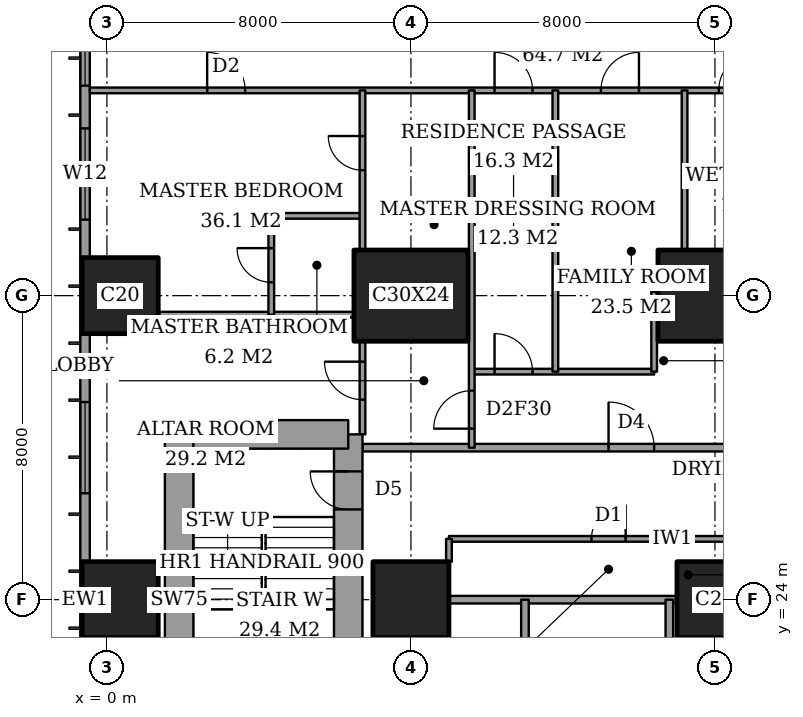
"""IFC4 building model, lengths in metres.
Left out: names, types, materials, properties, quantities, classifications, styles, units other than length and angle.
Written with IfcOpenShell. Run it as: python <this file> out.ifc"""

import sys

from ifc_helpers import new_model, si_unit, direction, frame, frame_2d, origin, origin_2d, place, context, subcontext, project, spatial, rectangle, extrude, element, fill, save


model = new_model("IFC4")
c1 = context("Model", 3, precision=1e-05, world=origin(), true_north=direction((0.0, 1.0)))
c2 = subcontext(c1, "Body", "Model", "MODEL_VIEW")
j1 = project(units=[si_unit("LENGTHUNIT", "METRE"), si_unit("PLANEANGLEUNIT", "RADIAN")], contexts=[c1])
p1 = place(None, origin())
s1 = spatial("IfcSite", under=j1, at=p1, CompositionType="ELEMENT")
p2 = place(p1, origin())
s2 = spatial("IfcBuilding", under=s1, at=p2, CompositionType="ELEMENT")
p3 = place(p2, frame((0.0, 0.0, 146.6)))
s3 = spatial("IfcBuildingStorey", under=s2, at=p3, CompositionType="ELEMENT", Elevation=146.6)
for number, where, z_axis, x_axis in (
    (1, (0.35, 24.0, 0.0), (0.0, 0.0, 1.0), (1.0, 0.0, 0.0)),
    (2, (0.35, 32.0, 0.0), (0.0, 0.0, 1.0), (1.0, 0.0, 0.0)),
    (3, (8.0, 24.0, 0.0), (0.0, 0.0, 1.0), (1.0, 0.0, 0.0)),
):
    element("IfcColumn", number, at=place(p3, frame(where, z_axis=z_axis, x_axis=x_axis)), inside=s3, PredefinedType="COLUMN", context=c2, shape_type="SweptSolid", body=[
        extrude(rectangle(XDim=2.0, YDim=2.0, at=origin_2d()), origin(), (0.0, 0.0, 1.0), 3.6),
    ])
p4 = place(p3, frame((8.0, 32.0, 0.0), z_axis=(0.0, 0.0, 1.0), x_axis=(1.0, 0.0, 0.0)))
e4 = element("IfcColumn", 4, at=p4, inside=s3, PredefinedType="COLUMN", context=c2, shape_type="SweptSolid", body=[
    extrude(rectangle(XDim=3.0, YDim=2.4, at=origin_2d()), origin(), (0.0, 0.0, 1.0), 3.6),
])
p5 = place(p3, frame((16.0, 24.0, 0.0), z_axis=(0.0, 0.0, 1.0), x_axis=(1.0, 0.0, 0.0)))
e5 = element("IfcColumn", 5, at=p5, inside=s3, PredefinedType="COLUMN", context=c2, shape_type="SweptSolid", body=[
    extrude(rectangle(XDim=2.0, YDim=2.0, at=origin_2d()), origin(), (0.0, 0.0, 1.0), 3.6),
])
p6 = place(p3, frame((16.0, 32.0, 0.0), z_axis=(0.0, 0.0, 1.0), x_axis=(1.0, 0.0, 0.0)))
e6 = element("IfcColumn", 6, at=p6, inside=s3, PredefinedType="COLUMN", context=c2, shape_type="SweptSolid", body=[
    extrude(rectangle(XDim=3.0, YDim=2.4, at=origin_2d()), origin(), (0.0, 0.0, 1.0), 3.6),
])
p7 = place(p3, frame((6.35, 19.65, 0.0), z_axis=(0.0, 0.0, 1.0), x_axis=(0.0, 1.0, 0.0)))
e7 = element("IfcWall", 7, at=p7, inside=s3, PredefinedType="SHEAR", context=c2, shape_type="SweptSolid", body=[
    extrude(rectangle(XDim=8.7, YDim=0.75, at=frame_2d((4.35, 0.0))), origin(), (0.0, 0.0, 1.0), 3.6),
])
p8 = place(p7, frame((6.725, 0.0, 0.0)))
e8 = element("IfcOpeningElement", 8, at=p8, cuts=e7, PredefinedType="OPENING", context=c2, shape_type="SweptSolid", body=[
    extrude(rectangle(XDim=1.0, YDim=2.1, at=frame_2d((0.5, 1.05))), frame((0.0, 0.385, 0.0), z_axis=(0.0, -1.0, 0.0), x_axis=(1.0, 0.0, 0.0)), (0.0, 0.0, 1.0), 0.77),
])
p9 = place(p3, frame((6.35, 28.35, 0.0), z_axis=(0.0, 0.0, 1.0), x_axis=(-1.0, 0.0, 0.0)))
e9 = element("IfcWall", 9, at=p9, inside=s3, PredefinedType="SHEAR", context=c2, shape_type="SweptSolid", body=[
    extrude(rectangle(XDim=4.45, YDim=0.75, at=frame_2d((2.225, 0.0))), origin(), (0.0, 0.0, 1.0), 3.6),
])
p10 = place(p3, frame((1.9, 28.35, 0.0), z_axis=(0.0, 0.0, 1.0), x_axis=(0.0, -1.0, 0.0)))
e10 = element("IfcWall", 10, at=p10, inside=s3, PredefinedType="SHEAR", context=c2, shape_type="SweptSolid", body=[
    extrude(rectangle(XDim=8.7, YDim=0.75, at=frame_2d((4.35, 0.0))), origin(), (0.0, 0.0, 1.0), 3.6),
])
p11 = place(p3, frame((-0.575, 44.825, 0.0), z_axis=(0.0, 0.0, 1.0), x_axis=(0.0, -1.0, 0.0)))
e11 = element("IfcWall", 11, at=p11, inside=s3, PredefinedType="SOLIDWALL", context=c2, shape_type="SweptSolid", body=[
    extrude(rectangle(XDim=41.65, YDim=0.25, at=frame_2d((20.825, 0.0))), origin(), (0.0, 0.0, 1.0), 3.6),
])
p12 = place(p11, frame((0.775, 0.0, 0.4)))
e12 = element("IfcOpeningElement", 12, at=p12, cuts=e11, PredefinedType="OPENING", context=c2, shape_type="SweptSolid", body=[
    extrude(rectangle(XDim=2.4, YDim=2.2, at=frame_2d((1.2, 1.1))), frame((0.0, 0.135, 0.0), z_axis=(0.0, -1.0, 0.0), x_axis=(1.0, 0.0, 0.0)), (0.0, 0.0, 1.0), 0.27),
])
p13 = place(p11, frame((6.1, 0.0, 0.4)))
e13 = element("IfcOpeningElement", 13, at=p13, cuts=e11, PredefinedType="OPENING", context=c2, shape_type="SweptSolid", body=[
    extrude(rectangle(XDim=1.2, YDim=2.2, at=frame_2d((0.6, 1.1))), frame((0.0, 0.135, 0.0), z_axis=(0.0, -1.0, 0.0), x_axis=(1.0, 0.0, 0.0)), (0.0, 0.0, 1.0), 0.27),
])
p14 = place(p11, frame((8.425, 0.0, 0.4)))
e14 = element("IfcOpeningElement", 14, at=p14, cuts=e11, PredefinedType="OPENING", context=c2, shape_type="SweptSolid", body=[
    extrude(rectangle(XDim=2.4, YDim=2.2, at=frame_2d((1.2, 1.1))), frame((0.0, 0.135, 0.0), z_axis=(0.0, -1.0, 0.0), x_axis=(1.0, 0.0, 0.0)), (0.0, 0.0, 1.0), 0.27),
])
p15 = place(p11, frame((15.625, 0.0, 0.4)))
e15 = element("IfcOpeningElement", 15, at=p15, cuts=e11, PredefinedType="OPENING", context=c2, shape_type="SweptSolid", body=[
    extrude(rectangle(XDim=2.4, YDim=2.2, at=frame_2d((1.2, 1.1))), frame((0.0, 0.135, 0.0), z_axis=(0.0, -1.0, 0.0), x_axis=(1.0, 0.0, 0.0)), (0.0, 0.0, 1.0), 0.27),
])
p16 = place(p11, frame((23.625, 0.0, 0.4)))
e16 = element("IfcOpeningElement", 16, at=p16, cuts=e11, PredefinedType="OPENING", context=c2, shape_type="SweptSolid", body=[
    extrude(rectangle(XDim=2.4, YDim=2.2, at=frame_2d((1.2, 1.1))), frame((0.0, 0.135, 0.0), z_axis=(0.0, -1.0, 0.0), x_axis=(1.0, 0.0, 0.0)), (0.0, 0.0, 1.0), 0.27),
])
p17 = place(p11, frame((30.625, 0.0, 0.4)))
e17 = element("IfcOpeningElement", 17, at=p17, cuts=e11, PredefinedType="OPENING", context=c2, shape_type="SweptSolid", body=[
    extrude(rectangle(XDim=2.4, YDim=2.2, at=frame_2d((1.2, 1.1))), frame((0.0, 0.135, 0.0), z_axis=(0.0, -1.0, 0.0), x_axis=(1.0, 0.0, 0.0)), (0.0, 0.0, 1.0), 0.27),
])
p18 = place(p11, frame((34.225, 0.0, 0.4)))
e18 = element("IfcOpeningElement", 18, at=p18, cuts=e11, PredefinedType="OPENING", context=c2, shape_type="SweptSolid", body=[
    extrude(rectangle(XDim=1.2, YDim=2.2, at=frame_2d((0.6, 1.1))), frame((0.0, 0.135, 0.0), z_axis=(0.0, -1.0, 0.0), x_axis=(1.0, 0.0, 0.0)), (0.0, 0.0, 1.0), 0.27),
])
p19 = place(p11, frame((38.475, 0.0, 0.4)))
e19 = element("IfcOpeningElement", 19, at=p19, cuts=e11, PredefinedType="OPENING", context=c2, shape_type="SweptSolid", body=[
    extrude(rectangle(XDim=2.4, YDim=2.2, at=frame_2d((1.2, 1.1))), frame((0.0, 0.135, 0.0), z_axis=(0.0, -1.0, 0.0), x_axis=(1.0, 0.0, 0.0)), (0.0, 0.0, 1.0), 0.27),
])
p20 = place(p3, frame((9.0, 24.0, 0.0), z_axis=(0.0, 0.0, 1.0), x_axis=(1.0, 0.0, 0.0)))
e20 = element("IfcWall", 20, at=p20, inside=s3, PredefinedType="PARTITIONING", context=c2, shape_type="SweptSolid", body=[
    extrude(rectangle(XDim=6.0, YDim=0.2, at=frame_2d((3.0, 0.0))), origin(), (0.0, 0.0, 1.0), 3.35),
])
p21 = place(p3, frame((9.0, 25.6, 0.0), z_axis=(0.0, 0.0, 1.0), x_axis=(1.0, 0.0, 0.0)))
e21 = element("IfcWall", 21, at=p21, inside=s3, PredefinedType="PARTITIONING", context=c2, shape_type="SweptSolid", body=[
    extrude(rectangle(XDim=8.4, YDim=0.15, at=frame_2d((4.2, 0.0))), origin(), (0.0, 0.0, 1.0), 3.35),
])
p22 = place(p21, frame((3.75, 0.0, 0.0)))
e22 = element("IfcOpeningElement", 22, at=p22, cuts=e21, PredefinedType="OPENING", context=c2, shape_type="SweptSolid", body=[
    extrude(rectangle(XDim=0.9, YDim=2.1, at=frame_2d((0.45, 1.05))), frame((0.0, 0.085, 0.0), z_axis=(0.0, -1.0, 0.0), x_axis=(1.0, 0.0, 0.0)), (0.0, 0.0, 1.0), 0.17),
])
p23 = place(p3, frame((6.725, 28.0, 0.0), z_axis=(0.0, 0.0, 1.0), x_axis=(1.0, 0.0, 0.0)))
e23 = element("IfcWall", 23, at=p23, inside=s3, PredefinedType="PARTITIONING", context=c2, shape_type="SweptSolid", body=[
    extrude(rectangle(XDim=17.275, YDim=0.2, at=frame_2d((8.637, 0.0))), origin(), (0.0, 0.0, 1.0), 3.35),
])
p24 = place(p23, frame((6.475, 0.0, 0.0)))
e24 = element("IfcOpeningElement", 24, at=p24, cuts=e23, PredefinedType="OPENING", context=c2, shape_type="SweptSolid", body=[
    extrude(rectangle(XDim=1.2, YDim=2.4, at=frame_2d((0.6, 1.2))), frame((0.0, 0.11, 0.0), z_axis=(0.0, -1.0, 0.0), x_axis=(1.0, 0.0, 0.0)), (0.0, 0.0, 1.0), 0.22),
])
p25 = place(p3, frame((9.6, 30.0, 0.0), z_axis=(0.0, 0.0, 1.0), x_axis=(1.0, 0.0, 0.0)))
e25 = element("IfcWall", 25, at=p25, inside=s3, PredefinedType="PARTITIONING", context=c2, shape_type="SweptSolid", body=[
    extrude(rectangle(XDim=4.8, YDim=0.15, at=frame_2d((2.4, 0.0))), origin(), (0.0, 0.0, 1.0), 3.35),
])
p26 = place(p25, frame((0.6, 0.0, 0.0)))
e26 = element("IfcOpeningElement", 26, at=p26, cuts=e25, PredefinedType="OPENING", context=c2, shape_type="SweptSolid", body=[
    extrude(rectangle(XDim=1.0, YDim=2.1, at=frame_2d((0.5, 1.05))), frame((0.0, 0.085, 0.0), z_axis=(0.0, -1.0, 0.0), x_axis=(1.0, 0.0, 0.0)), (0.0, 0.0, 1.0), 0.17),
])
p27 = place(p3, frame((1.35, 31.5, 0.0), z_axis=(0.0, 0.0, 1.0), x_axis=(1.0, 0.0, 0.0)))
e27 = element("IfcWall", 27, at=p27, inside=s3, PredefinedType="PARTITIONING", context=c2, shape_type="SweptSolid", body=[
    extrude(rectangle(XDim=5.15, YDim=0.15, at=frame_2d((2.575, 0.0))), origin(), (0.0, 0.0, 1.0), 3.35),
])
p28 = place(p3, frame((4.325, 34.1, 0.0), z_axis=(0.0, 0.0, 1.0), x_axis=(1.0, 0.0, 0.0)))
e28 = element("IfcWall", 28, at=p28, inside=s3, PredefinedType="PARTITIONING", context=c2, shape_type="SweptSolid", body=[
    extrude(rectangle(XDim=2.4, YDim=0.15, at=frame_2d((1.2, 0.0))), origin(), (0.0, 0.0, 1.0), 3.35),
])
p29 = place(p3, frame((-0.45, 37.4, 0.0), z_axis=(0.0, 0.0, 1.0), x_axis=(1.0, 0.0, 0.0)))
e29 = element("IfcWall", 29, at=p29, inside=s3, PredefinedType="PARTITIONING", context=c2, shape_type="SweptSolid", body=[
    extrude(rectangle(XDim=25.011, YDim=0.15, at=frame_2d((12.505, 0.0))), origin(), (0.0, 0.0, 1.0), 3.35),
])
p30 = place(p29, frame((10.65, 0.0, 0.0)))
e30 = element("IfcOpeningElement", 30, at=p30, cuts=e29, PredefinedType="OPENING", context=c2, shape_type="SweptSolid", body=[
    extrude(rectangle(XDim=1.0, YDim=2.1, at=frame_2d((0.5, 1.05))), frame((0.0, 0.085, 0.0), z_axis=(0.0, -1.0, 0.0), x_axis=(1.0, 0.0, 0.0)), (0.0, 0.0, 1.0), 0.17),
])
p31 = place(p29, frame((3.087, 0.0, 0.0)))
e31 = element("IfcOpeningElement", 31, at=p31, cuts=e29, PredefinedType="OPENING", context=c2, shape_type="SweptSolid", body=[
    extrude(rectangle(XDim=1.0, YDim=2.1, at=frame_2d((0.5, 1.05))), frame((0.0, 0.085, 0.0), z_axis=(0.0, -1.0, 0.0), x_axis=(1.0, 0.0, 0.0)), (0.0, 0.0, 1.0), 0.17),
])
p32 = place(p29, frame((13.45, 0.0, 0.0)))
e32 = element("IfcOpeningElement", 32, at=p32, cuts=e29, PredefinedType="OPENING", context=c2, shape_type="SweptSolid", body=[
    extrude(rectangle(XDim=1.0, YDim=2.1, at=frame_2d((0.5, 1.05))), frame((0.0, 0.085, 0.0), z_axis=(0.0, -1.0, 0.0), x_axis=(1.0, 0.0, 0.0)), (0.0, 0.0, 1.0), 0.17),
])
p33 = place(p29, frame((16.55, 0.0, 0.0)))
e33 = element("IfcOpeningElement", 33, at=p33, cuts=e29, PredefinedType="OPENING", context=c2, shape_type="SweptSolid", body=[
    extrude(rectangle(XDim=1.0, YDim=2.1, at=frame_2d((0.5, 1.05))), frame((0.0, 0.085, 0.0), z_axis=(0.0, -1.0, 0.0), x_axis=(1.0, 0.0, 0.0)), (0.0, 0.0, 1.0), 0.17),
])
p34 = place(p29, frame((21.175, 0.0, 0.0)))
e34 = element("IfcOpeningElement", 34, at=p34, cuts=e29, PredefinedType="OPENING", context=c2, shape_type="SweptSolid", body=[
    extrude(rectangle(XDim=1.0, YDim=2.1, at=frame_2d((0.5, 1.05))), frame((0.0, 0.085, 0.0), z_axis=(0.0, -1.0, 0.0), x_axis=(1.0, 0.0, 0.0)), (0.0, 0.0, 1.0), 0.17),
])
p35 = place(p3, frame((4.325, 31.5, 0.0), z_axis=(0.0, 0.0, 1.0), x_axis=(0.0, 1.0, 0.0)))
e35 = element("IfcWall", 35, at=p35, inside=s3, PredefinedType="PARTITIONING", context=c2, shape_type="SweptSolid", body=[
    extrude(rectangle(XDim=2.6, YDim=0.15, at=frame_2d((1.3, 0.0))), origin(), (0.0, 0.0, 1.0), 3.35),
])
p36 = place(p35, frame((0.85, 0.0, 0.0)))
e36 = element("IfcOpeningElement", 36, at=p36, cuts=e35, PredefinedType="OPENING", context=c2, shape_type="SweptSolid", body=[
    extrude(rectangle(XDim=0.9, YDim=2.1, at=frame_2d((0.45, 1.05))), frame((0.0, 0.085, 0.0), z_axis=(0.0, -1.0, 0.0), x_axis=(1.0, 0.0, 0.0)), (0.0, 0.0, 1.0), 0.17),
])
p37 = place(p3, frame((6.725, 28.35, 0.0), z_axis=(0.0, 0.0, 1.0), x_axis=(0.0, 1.0, 0.0)))
e37 = element("IfcWall", 37, at=p37, inside=s3, PredefinedType="PARTITIONING", context=c2, shape_type="SweptSolid", body=[
    extrude(rectangle(XDim=2.45, YDim=0.15, at=frame_2d((1.225, 0.0))), origin(), (0.0, 0.0, 1.0), 3.35),
])
p38 = place(p37, frame((0.913, 0.0, 0.0)))
e38 = element("IfcOpeningElement", 38, at=p38, cuts=e37, PredefinedType="OPENING", context=c2, shape_type="SweptSolid", body=[
    extrude(rectangle(XDim=1.0, YDim=2.1, at=frame_2d((0.5, 1.05))), frame((0.0, 0.085, 0.0), z_axis=(0.0, -1.0, 0.0), x_axis=(1.0, 0.0, 0.0)), (0.0, 0.0, 1.0), 0.17),
])
p39 = place(p3, frame((6.725, 33.2, 0.0), z_axis=(0.0, 0.0, 1.0), x_axis=(0.0, 1.0, 0.0)))
e39 = element("IfcWall", 39, at=p39, inside=s3, PredefinedType="PARTITIONING", context=c2, shape_type="SweptSolid", body=[
    extrude(rectangle(XDim=4.2, YDim=0.15, at=frame_2d((2.1, 0.0))), origin(), (0.0, 0.0, 1.0), 3.35),
])
p40 = place(p39, frame((2.1, 0.0, 0.0)))
e40 = element("IfcOpeningElement", 40, at=p40, cuts=e39, PredefinedType="OPENING", context=c2, shape_type="SweptSolid", body=[
    extrude(rectangle(XDim=0.9, YDim=2.1, at=frame_2d((0.45, 1.05))), frame((0.0, 0.085, 0.0), z_axis=(0.0, -1.0, 0.0), x_axis=(1.0, 0.0, 0.0)), (0.0, 0.0, 1.0), 0.17),
])
p41 = place(p3, frame((9.0, 25.0, 0.0), z_axis=(0.0, 0.0, 1.0), x_axis=(0.0, 1.0, 0.0)))
e41 = element("IfcWall", 41, at=p41, inside=s3, PredefinedType="PARTITIONING", context=c2, shape_type="SweptSolid", body=[
    extrude(rectangle(XDim=0.6, YDim=0.15, at=frame_2d((0.3, 0.0))), origin(), (0.0, 0.0, 1.0), 3.35),
])
p42 = place(p3, frame((9.6, 28.0, 0.0), z_axis=(0.0, 0.0, 1.0), x_axis=(0.0, 1.0, 0.0)))
e42 = element("IfcWall", 42, at=p42, inside=s3, PredefinedType="PARTITIONING", context=c2, shape_type="SweptSolid", body=[
    extrude(rectangle(XDim=9.4, YDim=0.15, at=frame_2d((4.7, 0.0))), origin(), (0.0, 0.0, 1.0), 3.35),
])
p43 = place(p42, frame((0.5, 0.0, 0.0)))
e43 = element("IfcOpeningElement", 43, at=p43, cuts=e42, PredefinedType="OPENING", context=c2, shape_type="SweptSolid", body=[
    extrude(rectangle(XDim=1.0, YDim=2.1, at=frame_2d((0.5, 1.05))), frame((0.0, 0.085, 0.0), z_axis=(0.0, -1.0, 0.0), x_axis=(1.0, 0.0, 0.0)), (0.0, 0.0, 1.0), 0.17),
])
p44 = place(p3, frame((11.0, 21.6, 0.0), z_axis=(0.0, 0.0, 1.0), x_axis=(0.0, 1.0, 0.0)))
e44 = element("IfcWall", 44, at=p44, inside=s3, PredefinedType="PARTITIONING", context=c2, shape_type="SweptSolid", body=[
    extrude(rectangle(XDim=2.4, YDim=0.2, at=frame_2d((1.2, 0.0))), origin(), (0.0, 0.0, 1.0), 3.35),
])
p45 = place(p3, frame((11.8, 30.0, 0.0), z_axis=(0.0, 0.0, 1.0), x_axis=(0.0, 1.0, 0.0)))
e45 = element("IfcWall", 45, at=p45, inside=s3, PredefinedType="PARTITIONING", context=c2, shape_type="SweptSolid", body=[
    extrude(rectangle(XDim=7.4, YDim=0.15, at=frame_2d((3.7, 0.0))), origin(), (0.0, 0.0, 1.0), 3.35),
])
p46 = place(p3, frame((14.4, 30.0, 0.0), z_axis=(0.0, 0.0, 1.0), x_axis=(0.0, 1.0, 0.0)))
e46 = element("IfcWall", 46, at=p46, inside=s3, PredefinedType="PARTITIONING", context=c2, shape_type="SweptSolid", body=[
    extrude(rectangle(XDim=2.1, YDim=0.15, at=frame_2d((1.05, 0.0))), origin(), (0.0, 0.0, 1.0), 3.35),
])
p47 = place(p3, frame((14.8, 21.6, 0.0), z_axis=(0.0, 0.0, 1.0), x_axis=(0.0, 1.0, 0.0)))
e47 = element("IfcWall", 47, at=p47, inside=s3, PredefinedType="PARTITIONING", context=c2, shape_type="SweptSolid", body=[
    extrude(rectangle(XDim=2.4, YDim=0.2, at=frame_2d((1.2, 0.0))), origin(), (0.0, 0.0, 1.0), 3.35),
])
p48 = place(p3, frame((15.2, 33.2, 0.0), z_axis=(0.0, 0.0, 1.0), x_axis=(0.0, 1.0, 0.0)))
e48 = element("IfcWall", 48, at=p48, inside=s3, PredefinedType="PARTITIONING", context=c2, shape_type="SweptSolid", body=[
    extrude(rectangle(XDim=4.2, YDim=0.15, at=frame_2d((2.1, 0.0))), origin(), (0.0, 0.0, 1.0), 3.35),
])
p49 = place(p13, origin())
e49 = element("IfcWindow", 49, at=p49, inside=s3, PartitioningType="SINGLE_PANEL", PredefinedType="WINDOW", context=c2, shape_type="SweptSolid", body=[
    extrude(rectangle(XDim=1.2, YDim=2.2, at=frame_2d((0.6, 1.1))), frame((0.0, 0.03, 0.0), z_axis=(0.0, -1.0, 0.0), x_axis=(1.0, 0.0, 0.0)), (0.0, 0.0, 1.0), 0.06),
])
fill(e13, e49)
p50 = place(p14, origin())
e50 = element("IfcWindow", 50, at=p50, inside=s3, PartitioningType="SINGLE_PANEL", PredefinedType="WINDOW", context=c2, shape_type="SweptSolid", body=[
    extrude(rectangle(XDim=2.4, YDim=2.2, at=frame_2d((1.2, 1.1))), frame((0.0, 0.03, 0.0), z_axis=(0.0, -1.0, 0.0), x_axis=(1.0, 0.0, 0.0)), (0.0, 0.0, 1.0), 0.06),
])
fill(e14, e50)
p51 = place(p15, origin())
e51 = element("IfcWindow", 51, at=p51, inside=s3, PartitioningType="SINGLE_PANEL", PredefinedType="WINDOW", context=c2, shape_type="SweptSolid", body=[
    extrude(rectangle(XDim=2.4, YDim=2.2, at=frame_2d((1.2, 1.1))), frame((0.0, 0.03, 0.0), z_axis=(0.0, -1.0, 0.0), x_axis=(1.0, 0.0, 0.0)), (0.0, 0.0, 1.0), 0.06),
])
fill(e15, e51)
p52 = place(p30, origin())
e52 = element("IfcDoor", 52, at=p52, inside=s3, OperationType="SINGLE_SWING_RIGHT", PredefinedType="DOOR", context=c2, shape_type="SweptSolid", body=[
    extrude(rectangle(XDim=1.0, YDim=2.1, at=frame_2d((0.5, 1.05))), frame((0.0, 0.025, 0.0), z_axis=(0.0, -1.0, 0.0), x_axis=(1.0, 0.0, 0.0)), (0.0, 0.0, 1.0), 0.05),
])
fill(e30, e52)
p53 = place(p36, origin())
e53 = element("IfcDoor", 53, at=p53, inside=s3, OperationType="SINGLE_SWING_LEFT", PredefinedType="DOOR", context=c2, shape_type="SweptSolid", body=[
    extrude(rectangle(XDim=0.9, YDim=2.1, at=frame_2d((0.45, 1.05))), frame((0.0, 0.025, 0.0), z_axis=(0.0, -1.0, 0.0), x_axis=(1.0, 0.0, 0.0)), (0.0, 0.0, 1.0), 0.05),
])
fill(e36, e53)
p54 = place(p31, origin())
e54 = element("IfcDoor", 54, at=p54, inside=s3, OperationType="SINGLE_SWING_RIGHT", PredefinedType="DOOR", context=c2, shape_type="SweptSolid", body=[
    extrude(rectangle(XDim=1.0, YDim=2.1, at=frame_2d((0.5, 1.05))), frame((0.0, 0.025, 0.0), z_axis=(0.0, -1.0, 0.0), x_axis=(1.0, 0.0, 0.0)), (0.0, 0.0, 1.0), 0.05),
])
fill(e31, e54)
p55 = place(p38, origin())
e55 = element("IfcDoor", 55, at=p55, inside=s3, OperationType="SINGLE_SWING_LEFT", PredefinedType="DOOR", context=c2, shape_type="SweptSolid", body=[
    extrude(rectangle(XDim=1.0, YDim=2.1, at=frame_2d((0.5, 1.05))), frame((0.0, 0.025, 0.0), z_axis=(0.0, -1.0, 0.0), x_axis=(1.0, 0.0, 0.0)), (0.0, 0.0, 1.0), 0.05),
])
fill(e38, e55)
p56 = place(p40, origin())
e56 = element("IfcDoor", 56, at=p56, inside=s3, OperationType="SINGLE_SWING_LEFT", PredefinedType="DOOR", context=c2, shape_type="SweptSolid", body=[
    extrude(rectangle(XDim=0.9, YDim=2.1, at=frame_2d((0.45, 1.05))), frame((0.0, 0.025, 0.0), z_axis=(0.0, -1.0, 0.0), x_axis=(1.0, 0.0, 0.0)), (0.0, 0.0, 1.0), 0.05),
])
fill(e40, e56)
p57 = place(p43, origin())
e57 = element("IfcDoor", 57, at=p57, inside=s3, OperationType="SINGLE_SWING_RIGHT", PredefinedType="DOOR", context=c2, shape_type="SweptSolid", body=[
    extrude(rectangle(XDim=1.0, YDim=2.1, at=frame_2d((0.5, 1.05))), frame((0.0, 0.025, 0.0), z_axis=(0.0, -1.0, 0.0), x_axis=(1.0, 0.0, 0.0)), (0.0, 0.0, 1.0), 0.05),
])
fill(e43, e57)
p58 = place(p24, origin())
e58 = element("IfcDoor", 58, at=p58, inside=s3, OperationType="SINGLE_SWING_RIGHT", PredefinedType="DOOR", context=c2, shape_type="SweptSolid", body=[
    extrude(rectangle(XDim=1.2, YDim=2.4, at=frame_2d((0.6, 1.2))), frame((0.0, 0.025, 0.0), z_axis=(0.0, -1.0, 0.0), x_axis=(1.0, 0.0, 0.0)), (0.0, 0.0, 1.0), 0.05),
])
fill(e24, e58)
p59 = place(p26, origin())
e59 = element("IfcDoor", 59, at=p59, inside=s3, OperationType="SINGLE_SWING_RIGHT", PredefinedType="DOOR", context=c2, shape_type="SweptSolid", body=[
    extrude(rectangle(XDim=1.0, YDim=2.1, at=frame_2d((0.5, 1.05))), frame((0.0, 0.025, 0.0), z_axis=(0.0, -1.0, 0.0), x_axis=(1.0, 0.0, 0.0)), (0.0, 0.0, 1.0), 0.05),
])
fill(e26, e59)
p60 = place(p32, origin())
e60 = element("IfcDoor", 60, at=p60, inside=s3, OperationType="SINGLE_SWING_LEFT", PredefinedType="DOOR", context=c2, shape_type="SweptSolid", body=[
    extrude(rectangle(XDim=1.0, YDim=2.1, at=frame_2d((0.5, 1.05))), frame((0.0, 0.025, 0.0), z_axis=(0.0, -1.0, 0.0), x_axis=(1.0, 0.0, 0.0)), (0.0, 0.0, 1.0), 0.05),
])
fill(e32, e60)
p61 = place(p33, origin())
e61 = element("IfcDoor", 61, at=p61, inside=s3, OperationType="SINGLE_SWING_LEFT", PredefinedType="DOOR", context=c2, shape_type="SweptSolid", body=[
    extrude(rectangle(XDim=1.0, YDim=2.1, at=frame_2d((0.5, 1.05))), frame((0.0, 0.025, 0.0), z_axis=(0.0, -1.0, 0.0), x_axis=(1.0, 0.0, 0.0)), (0.0, 0.0, 1.0), 0.05),
])
fill(e33, e61)
p62 = place(p22, origin())
e62 = element("IfcDoor", 62, at=p62, inside=s3, OperationType="SINGLE_SWING_LEFT", PredefinedType="DOOR", context=c2, shape_type="SweptSolid", body=[
    extrude(rectangle(XDim=0.9, YDim=2.1, at=frame_2d((0.45, 1.05))), frame((0.0, 0.025, 0.0), z_axis=(0.0, -1.0, 0.0), x_axis=(1.0, 0.0, 0.0)), (0.0, 0.0, 1.0), 0.05),
])
fill(e22, e62)
p63 = place(p8, origin())
e63 = element("IfcDoor", 63, at=p63, inside=s3, OperationType="SINGLE_SWING_LEFT", PredefinedType="DOOR", context=c2, shape_type="SweptSolid", body=[
    extrude(rectangle(XDim=1.0, YDim=2.1, at=frame_2d((0.5, 1.05))), frame((0.0, 0.025, 0.0), z_axis=(0.0, -1.0, 0.0), x_axis=(1.0, 0.0, 0.0)), (0.0, 0.0, 1.0), 0.05),
])
fill(e8, e63)
save(model, sys.argv[1])
